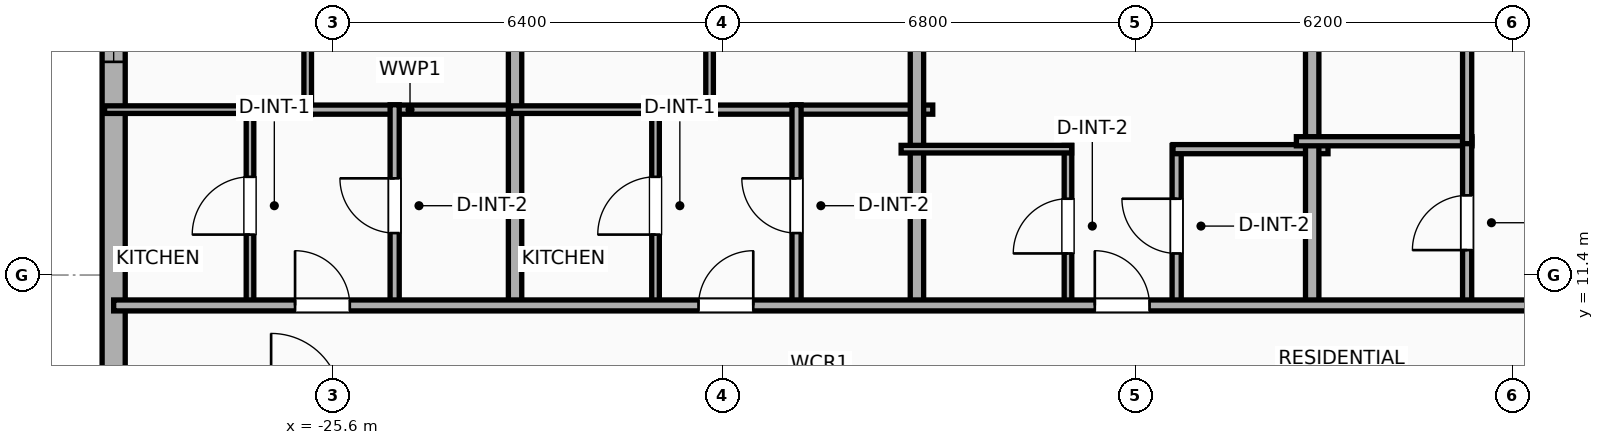
"""IFC4 building model, lengths in metres.
Left out: names, types, materials, properties, quantities, classifications, styles, units other than length and angle.
Written with IfcOpenShell. Run it as: python <this file> out.ifc"""

import sys

from ifc_helpers import new_model, si_unit, direction, frame, frame_2d, origin, place, context, subcontext, project, spatial, rectangle, extrude, element, fill, save


model = new_model("IFC4")
c1 = context("Model", 3, precision=1e-05, world=origin(), true_north=direction((0.0, 1.0)))
c2 = subcontext(c1, "Body", "Model", "MODEL_VIEW")
j1 = project(units=[si_unit("LENGTHUNIT", "METRE"), si_unit("PLANEANGLEUNIT", "RADIAN")], contexts=[c1])
p1 = place(None, origin())
s1 = spatial("IfcSite", under=j1, at=p1, CompositionType="ELEMENT")
p2 = place(p1, origin())
s2 = spatial("IfcBuilding", under=s1, at=p2, CompositionType="ELEMENT")
p3 = place(p2, frame((0.0, 0.0, 89.7)))
s3 = spatial("IfcBuildingStorey", under=s2, at=p3, CompositionType="ELEMENT", Elevation=89.7)
p4 = place(p3, frame((-29.21, -16.581, 0.0), z_axis=(0.0, 0.0, 1.0), x_axis=(0.0, 1.0, 0.0)))
e1 = element("IfcWall", 1, at=p4, inside=s3, PredefinedType="ELEMENTEDWALL", context=c2, shape_type="SweptSolid", body=[
    extrude(rectangle(XDim=34.363, YDim=0.38, at=frame_2d((17.181, 0.0))), origin(), (0.0, 0.0, 1.0), 2.54),
])
p5 = place(p4, frame((31.487, 0.0, 0.75)))
e2 = element("IfcOpeningElement", 2, at=p5, cuts=e1, PredefinedType="OPENING", context=c2, shape_type="SweptSolid", body=[
    extrude(rectangle(XDim=1.2, YDim=1.63, at=frame_2d((0.6, 0.815))), frame((0.0, 0.2, 0.0), z_axis=(0.0, -1.0, 0.0), x_axis=(1.0, 0.0, 0.0)), (0.0, 0.0, 1.0), 0.4),
])
p6 = place(p4, frame((20.726, 0.0, 0.75)))
e3 = element("IfcOpeningElement", 3, at=p6, cuts=e1, PredefinedType="OPENING", context=c2, shape_type="SweptSolid", body=[
    extrude(rectangle(XDim=1.2, YDim=1.63, at=frame_2d((0.6, 0.815))), frame((0.0, 0.2, 0.0), z_axis=(0.0, -1.0, 0.0), x_axis=(1.0, 0.0, 0.0)), (0.0, 0.0, 1.0), 0.4),
])
p7 = place(p4, frame((11.376, 0.0, 0.75)))
e4 = element("IfcOpeningElement", 4, at=p7, cuts=e1, PredefinedType="OPENING", context=c2, shape_type="SweptSolid", body=[
    extrude(rectangle(XDim=1.2, YDim=1.63, at=frame_2d((0.6, 0.815))), frame((0.0, 0.2, 0.0), z_axis=(0.0, -1.0, 0.0), x_axis=(1.0, 0.0, 0.0)), (0.0, 0.0, 1.0), 0.4),
])
p8 = place(p3, frame((-26.019, 14.04, 0.0), z_axis=(0.0, 0.0, 1.0), x_axis=(0.0, 1.0, 0.0)))
e5 = element("IfcWall", 5, at=p8, inside=s3, PredefinedType="PARTITIONING", context=c2, shape_type="SweptSolid", body=[
    extrude(rectangle(XDim=7.596, YDim=0.125, at=frame_2d((3.798, 0.0))), origin(), (0.0, 0.0, 1.0), 3.65),
])
p9 = place(p8, frame((1.373, 0.0, 0.0)))
e6 = element("IfcOpeningElement", 6, at=p9, cuts=e5, PredefinedType="OPENING", context=c2, shape_type="SweptSolid", body=[
    extrude(rectangle(XDim=0.9, YDim=2.05, at=frame_2d((0.45, 1.025))), frame((0.0, 0.073, 0.0), z_axis=(0.0, -1.0, 0.0), x_axis=(1.0, 0.0, 0.0)), (0.0, 0.0, 1.0), 0.145),
])
p10 = place(p3, frame((-26.139, 14.12, 0.0), z_axis=(0.0, 0.0, 1.0), x_axis=(1.0, 0.0, 0.0)))
e7 = element("IfcWall", 7, at=p10, inside=s3, PredefinedType="PLUMBINGWALL", context=c2, shape_type="SweptSolid", body=[
    extrude(rectangle(XDim=3.605, YDim=0.15, at=frame_2d((1.802, 0.0))), origin(), (0.0, 0.0, 1.0), 3.65),
])
p11 = place(p3, frame((-26.968, 10.88, 0.0), z_axis=(0.0, 0.0, 1.0), x_axis=(0.0, 1.0, 0.0)))
e8 = element("IfcWall", 8, at=p11, inside=s3, PredefinedType="PARTITIONING", context=c2, shape_type="SweptSolid", body=[
    extrude(rectangle(XDim=3.32, YDim=0.125, at=frame_2d((1.66, 0.0))), origin(), (0.0, 0.0, 1.0), 3.65),
])
p12 = place(p11, frame((1.185, 0.0, 0.0)))
e9 = element("IfcOpeningElement", 9, at=p12, cuts=e8, PredefinedType="OPENING", context=c2, shape_type="SweptSolid", body=[
    extrude(rectangle(XDim=0.95, YDim=2.05, at=frame_2d((0.475, 1.025))), frame((0.0, 0.073, 0.0), z_axis=(0.0, -1.0, 0.0), x_axis=(1.0, 0.0, 0.0)), (0.0, 0.0, 1.0), 0.145),
])
p13 = place(p3, frame((-29.36, 14.12, 0.0), z_axis=(0.0, 0.0, 1.0), x_axis=(1.0, 0.0, 0.0)))
e10 = element("IfcWall", 10, at=p13, inside=s3, PredefinedType="PARTITIONING", context=c2, shape_type="SweptSolid", body=[
    extrude(rectangle(XDim=2.512, YDim=0.125, at=frame_2d((1.256, 0.0))), origin(), (0.0, 0.0, 1.0), 3.65),
])
p14 = place(p3, frame((-24.589, 10.88, 0.0), z_axis=(0.0, 0.0, 1.0), x_axis=(0.0, 1.0, 0.0)))
e11 = element("IfcWall", 11, at=p14, inside=s3, PredefinedType="PLUMBINGWALL", context=c2, shape_type="SweptSolid", body=[
    extrude(rectangle(XDim=3.32, YDim=0.15, at=frame_2d((1.66, 0.0))), origin(), (0.0, 0.0, 1.0), 3.65),
])
p15 = place(p14, frame((1.21, 0.0, 0.0)))
e12 = element("IfcOpeningElement", 12, at=p15, cuts=e11, PredefinedType="OPENING", context=c2, shape_type="SweptSolid", body=[
    extrude(rectangle(XDim=0.9, YDim=2.05, at=frame_2d((0.45, 1.025))), frame((0.0, 0.085, 0.0), z_axis=(0.0, -1.0, 0.0), x_axis=(1.0, 0.0, 0.0)), (0.0, 0.0, 1.0), 0.17),
])
p16 = place(p3, frame((-22.609, 10.82, 0.0), z_axis=(0.0, 0.0, 1.0), x_axis=(0.0, 1.0, 0.0)))
e13 = element("IfcWall", 13, at=p16, inside=s3, PredefinedType="PARTITIONING", context=c2, shape_type="SweptSolid", body=[
    extrude(rectangle(XDim=10.79, YDim=0.22, at=frame_2d((5.395, 0.0))), origin(), (0.0, 0.0, 1.0), 3.65),
])
p17 = place(p3, frame((-19.41, 14.04, 0.0), z_axis=(0.0, 0.0, 1.0), x_axis=(0.0, 1.0, 0.0)))
e14 = element("IfcWall", 14, at=p17, inside=s3, PredefinedType="PARTITIONING", context=c2, shape_type="SweptSolid", body=[
    extrude(rectangle(XDim=7.72, YDim=0.125, at=frame_2d((3.86, 0.0))), origin(), (0.0, 0.0, 1.0), 3.65),
])
p18 = place(p17, frame((1.403, 0.0, 0.0)))
e15 = element("IfcOpeningElement", 15, at=p18, cuts=e14, PredefinedType="OPENING", context=c2, shape_type="SweptSolid", body=[
    extrude(rectangle(XDim=0.9, YDim=2.05, at=frame_2d((0.45, 1.025))), frame((0.0, 0.073, 0.0), z_axis=(0.0, -1.0, 0.0), x_axis=(1.0, 0.0, 0.0)), (0.0, 0.0, 1.0), 0.145),
])
p19 = place(p3, frame((-19.53, 14.12, 0.0), z_axis=(0.0, 0.0, 1.0), x_axis=(1.0, 0.0, 0.0)))
e16 = element("IfcWall", 16, at=p19, inside=s3, PredefinedType="PLUMBINGWALL", context=c2, shape_type="SweptSolid", body=[
    extrude(rectangle(XDim=3.79, YDim=0.15, at=frame_2d((1.895, 0.0))), origin(), (0.0, 0.0, 1.0), 3.65),
])
p20 = place(p3, frame((-20.299, 10.88, 0.0), z_axis=(0.0, 0.0, 1.0), x_axis=(0.0, 1.0, 0.0)))
e17 = element("IfcWall", 17, at=p20, inside=s3, PredefinedType="PARTITIONING", context=c2, shape_type="SweptSolid", body=[
    extrude(rectangle(XDim=3.32, YDim=0.125, at=frame_2d((1.66, 0.0))), origin(), (0.0, 0.0, 1.0), 3.65),
])
p21 = place(p20, frame((1.185, 0.0, 0.0)))
e18 = element("IfcOpeningElement", 18, at=p21, cuts=e17, PredefinedType="OPENING", context=c2, shape_type="SweptSolid", body=[
    extrude(rectangle(XDim=0.95, YDim=2.05, at=frame_2d((0.475, 1.025))), frame((0.0, 0.073, 0.0), z_axis=(0.0, -1.0, 0.0), x_axis=(1.0, 0.0, 0.0)), (0.0, 0.0, 1.0), 0.145),
])
p22 = place(p3, frame((-22.684, 14.12, 0.0), z_axis=(0.0, 0.0, 1.0), x_axis=(1.0, 0.0, 0.0)))
e19 = element("IfcWall", 19, at=p22, inside=s3, PredefinedType="PARTITIONING", context=c2, shape_type="SweptSolid", body=[
    extrude(rectangle(XDim=2.505, YDim=0.125, at=frame_2d((1.252, 0.0))), origin(), (0.0, 0.0, 1.0), 3.65),
])
p23 = place(p3, frame((-17.98, 10.88, 0.0), z_axis=(0.0, 0.0, 1.0), x_axis=(0.0, 1.0, 0.0)))
e20 = element("IfcWall", 20, at=p23, inside=s3, PredefinedType="PLUMBINGWALL", context=c2, shape_type="SweptSolid", body=[
    extrude(rectangle(XDim=3.32, YDim=0.15, at=frame_2d((1.66, 0.0))), origin(), (0.0, 0.0, 1.0), 3.65),
])
p24 = place(p23, frame((1.21, 0.0, 0.0)))
e21 = element("IfcOpeningElement", 21, at=p24, cuts=e20, PredefinedType="OPENING", context=c2, shape_type="SweptSolid", body=[
    extrude(rectangle(XDim=0.9, YDim=2.05, at=frame_2d((0.45, 1.025))), frame((0.0, 0.085, 0.0), z_axis=(0.0, -1.0, 0.0), x_axis=(1.0, 0.0, 0.0)), (0.0, 0.0, 1.0), 0.17),
])
p25 = place(p3, frame((-16.0, 10.82, 0.0), z_axis=(0.0, 0.0, 1.0), x_axis=(0.0, 1.0, 0.0)))
e22 = element("IfcWall", 22, at=p25, inside=s3, PredefinedType="PARTITIONING", context=c2, shape_type="SweptSolid", body=[
    extrude(rectangle(XDim=10.79, YDim=0.22, at=frame_2d((5.395, 0.0))), origin(), (0.0, 0.0, 1.0), 3.65),
])
p26 = place(p3, frame((-13.516, 10.88, 0.0), z_axis=(0.0, 0.0, 1.0), x_axis=(0.0, 1.0, 0.0)))
e23 = element("IfcWall", 23, at=p26, inside=s3, PredefinedType="PARTITIONING", context=c2, shape_type="SweptSolid", body=[
    extrude(rectangle(XDim=2.65, YDim=0.125, at=frame_2d((1.325, 0.0))), origin(), (0.0, 0.0, 1.0), 3.65),
])
p27 = place(p26, frame((0.875, 0.0, 0.0)))
e24 = element("IfcOpeningElement", 24, at=p27, cuts=e23, PredefinedType="OPENING", context=c2, shape_type="SweptSolid", body=[
    extrude(rectangle(XDim=0.9, YDim=2.05, at=frame_2d((0.45, 1.025))), frame((0.0, 0.073, 0.0), z_axis=(0.0, -1.0, 0.0), x_axis=(1.0, 0.0, 0.0)), (0.0, 0.0, 1.0), 0.145),
])
p28 = place(p3, frame((-11.729, 10.88, 0.0), z_axis=(0.0, 0.0, 1.0), x_axis=(0.0, 1.0, 0.0)))
e25 = element("IfcWall", 25, at=p28, inside=s3, PredefinedType="PLUMBINGWALL", context=c2, shape_type="SweptSolid", body=[
    extrude(rectangle(XDim=2.65, YDim=0.15, at=frame_2d((1.325, 0.0))), origin(), (0.0, 0.0, 1.0), 3.65),
])
p29 = place(p28, frame((0.875, 0.0, 0.0)))
e26 = element("IfcOpeningElement", 26, at=p29, cuts=e25, PredefinedType="OPENING", context=c2, shape_type="SweptSolid", body=[
    extrude(rectangle(XDim=0.9, YDim=2.05, at=frame_2d((0.45, 1.025))), frame((0.0, 0.085, 0.0), z_axis=(0.0, -1.0, 0.0), x_axis=(1.0, 0.0, 0.0)), (0.0, 0.0, 1.0), 0.17),
])
p30 = place(p3, frame((-16.26, 13.47, 0.0), z_axis=(0.0, 0.0, 1.0), x_axis=(1.0, 0.0, 0.0)))
e27 = element("IfcWall", 27, at=p30, inside=s3, PredefinedType="PARTITIONING", context=c2, shape_type="SweptSolid", body=[
    extrude(rectangle(XDim=2.804, YDim=0.125, at=frame_2d((1.402, 0.0))), origin(), (0.0, 0.0, 1.0), 3.65),
])
p31 = place(p3, frame((-11.789, 13.47, 0.0), z_axis=(0.0, 0.0, 1.0), x_axis=(1.0, 0.0, 0.0)))
e28 = element("IfcWall", 28, at=p31, inside=s3, PredefinedType="PLUMBINGWALL", context=c2, shape_type="SweptSolid", body=[
    extrude(rectangle(XDim=2.549, YDim=0.15, at=frame_2d((1.274, 0.0))), origin(), (0.0, 0.0, 1.0), 3.65),
])
p32 = place(p3, frame((-9.5, 10.82, 0.0), z_axis=(0.0, 0.0, 1.0), x_axis=(0.0, 1.0, 0.0)))
e29 = element("IfcWall", 29, at=p32, inside=s3, PredefinedType="PARTITIONING", context=c2, shape_type="SweptSolid", body=[
    extrude(rectangle(XDim=10.79, YDim=0.22, at=frame_2d((5.395, 0.0))), origin(), (0.0, 0.0, 1.0), 3.65),
])
p33 = place(p3, frame((-9.76, 13.6, 0.0), z_axis=(0.0, 0.0, 1.0), x_axis=(1.0, 0.0, 0.0)))
e30 = element("IfcWall", 30, at=p33, inside=s3, PredefinedType="PLUMBINGWALL", context=c2, shape_type="SweptSolid", body=[
    extrude(rectangle(XDim=2.888, YDim=0.15, at=frame_2d((1.444, 0.0))), origin(), (0.0, 0.0, 1.0), 3.65),
])
p34 = place(p3, frame((-6.952, 10.88, 0.0), z_axis=(0.0, 0.0, 1.0), x_axis=(0.0, 1.0, 0.0)))
e31 = element("IfcWall", 31, at=p34, inside=s3, PredefinedType="PLUMBINGWALL", context=c2, shape_type="SweptSolid", body=[
    extrude(rectangle(XDim=2.76, YDim=0.15, at=frame_2d((1.38, 0.0))), origin(), (0.0, 0.0, 1.0), 3.65),
])
p35 = place(p34, frame((0.93, 0.0, 0.0)))
e32 = element("IfcOpeningElement", 32, at=p35, cuts=e31, PredefinedType="OPENING", context=c2, shape_type="SweptSolid", body=[
    extrude(rectangle(XDim=0.9, YDim=2.05, at=frame_2d((0.45, 1.025))), frame((0.0, 0.085, 0.0), z_axis=(0.0, -1.0, 0.0), x_axis=(1.0, 0.0, 0.0)), (0.0, 0.0, 1.0), 0.17),
])
p36 = place(p3, frame((-6.952, 13.56, 0.0), z_axis=(0.0, 0.0, 1.0), x_axis=(0.0, 1.0, 0.0)))
e33 = element("IfcWall", 33, at=p36, inside=s3, PredefinedType="PLUMBINGWALL", context=c2, shape_type="SweptSolid", body=[
    extrude(rectangle(XDim=8.098, YDim=0.15, at=frame_2d((4.049, 0.0))), origin(), (0.0, 0.0, 1.0), 3.65),
])
p37 = place(p36, frame((3.599, 0.0, 0.0)))
e34 = element("IfcOpeningElement", 34, at=p37, cuts=e33, PredefinedType="OPENING", context=c2, shape_type="SweptSolid", body=[
    extrude(rectangle(XDim=0.9, YDim=2.05, at=frame_2d((0.45, 1.025))), frame((0.0, 0.085, 0.0), z_axis=(0.0, -1.0, 0.0), x_axis=(1.0, 0.0, 0.0)), (0.0, 0.0, 1.0), 0.17),
])
p38 = place(p3, frame((-29.21, 10.9, 0.0), z_axis=(0.0, 0.0, 1.0), x_axis=(1.0, 0.0, 0.0)))
e35 = element("IfcWall", 35, at=p38, inside=s3, PredefinedType="PARTITIONING", context=c2, shape_type="SweptSolid", body=[
    extrude(rectangle(XDim=62.42, YDim=0.18, at=frame_2d((31.21, 0.0))), origin(), (0.0, 0.0, 1.0), 3.65),
])
p39 = place(p38, frame((2.983, 0.0, 0.0)))
e36 = element("IfcOpeningElement", 36, at=p39, cuts=e35, PredefinedType="OPENING", context=c2, shape_type="SweptSolid", body=[
    extrude(rectangle(XDim=0.9, YDim=2.05, at=frame_2d((0.45, 1.025))), frame((0.0, 0.1, 0.0), z_axis=(0.0, -1.0, 0.0), x_axis=(1.0, 0.0, 0.0)), (0.0, 0.0, 1.0), 0.2),
])
p40 = place(p38, frame((9.618, 0.0, 0.0)))
e37 = element("IfcOpeningElement", 37, at=p40, cuts=e35, PredefinedType="OPENING", context=c2, shape_type="SweptSolid", body=[
    extrude(rectangle(XDim=0.9, YDim=2.05, at=frame_2d((0.45, 1.025))), frame((0.0, 0.1, 0.0), z_axis=(0.0, -1.0, 0.0), x_axis=(1.0, 0.0, 0.0)), (0.0, 0.0, 1.0), 0.2),
])
p41 = place(p38, frame((16.135, 0.0, 0.0)))
e38 = element("IfcOpeningElement", 38, at=p41, cuts=e35, PredefinedType="OPENING", context=c2, shape_type="SweptSolid", body=[
    extrude(rectangle(XDim=0.9, YDim=2.05, at=frame_2d((0.45, 1.025))), frame((0.0, 0.1, 0.0), z_axis=(0.0, -1.0, 0.0), x_axis=(1.0, 0.0, 0.0)), (0.0, 0.0, 1.0), 0.2),
])
p42 = place(p38, frame((23.632, 0.0, 0.0)))
e39 = element("IfcOpeningElement", 39, at=p42, cuts=e35, PredefinedType="OPENING", context=c2, shape_type="SweptSolid", body=[
    extrude(rectangle(XDim=1.15, YDim=2.05, at=frame_2d((0.575, 1.025))), frame((0.0, 0.1, 0.0), z_axis=(0.0, -1.0, 0.0), x_axis=(1.0, 0.0, 0.0)), (0.0, 0.0, 1.0), 0.2),
])
p43 = place(p38, frame((27.751, 0.0, 0.0)))
e40 = element("IfcOpeningElement", 40, at=p43, cuts=e35, PredefinedType="OPENING", context=c2, shape_type="SweptSolid", body=[
    extrude(rectangle(XDim=1.15, YDim=2.05, at=frame_2d((0.575, 1.025))), frame((0.0, 0.1, 0.0), z_axis=(0.0, -1.0, 0.0), x_axis=(1.0, 0.0, 0.0)), (0.0, 0.0, 1.0), 0.2),
])
p44 = place(p38, frame((35.635, 0.0, 0.0)))
e41 = element("IfcOpeningElement", 41, at=p44, cuts=e35, PredefinedType="OPENING", context=c2, shape_type="SweptSolid", body=[
    extrude(rectangle(XDim=0.9, YDim=2.05, at=frame_2d((0.45, 1.025))), frame((0.0, 0.1, 0.0), z_axis=(0.0, -1.0, 0.0), x_axis=(1.0, 0.0, 0.0)), (0.0, 0.0, 1.0), 0.2),
])
p45 = place(p38, frame((40.616, 0.0, 0.0)))
e42 = element("IfcOpeningElement", 42, at=p45, cuts=e35, PredefinedType="OPENING", context=c2, shape_type="SweptSolid", body=[
    extrude(rectangle(XDim=1.15, YDim=2.05, at=frame_2d((0.575, 1.025))), frame((0.0, 0.1, 0.0), z_axis=(0.0, -1.0, 0.0), x_axis=(1.0, 0.0, 0.0)), (0.0, 0.0, 1.0), 0.2),
])
p46 = place(p38, frame((48.256, 0.0, 0.0)))
e43 = element("IfcOpeningElement", 43, at=p46, cuts=e35, PredefinedType="OPENING", context=c2, shape_type="SweptSolid", body=[
    extrude(rectangle(XDim=0.9, YDim=2.05, at=frame_2d((0.45, 1.025))), frame((0.0, 0.1, 0.0), z_axis=(0.0, -1.0, 0.0), x_axis=(1.0, 0.0, 0.0)), (0.0, 0.0, 1.0), 0.2),
])
p47 = place(p38, frame((57.032, 0.0, 0.0)))
e44 = element("IfcOpeningElement", 44, at=p47, cuts=e35, PredefinedType="OPENING", context=c2, shape_type="SweptSolid", body=[
    extrude(rectangle(XDim=1.15, YDim=2.05, at=frame_2d((0.575, 1.025))), frame((0.0, 0.1, 0.0), z_axis=(0.0, -1.0, 0.0), x_axis=(1.0, 0.0, 0.0)), (0.0, 0.0, 1.0), 0.2),
])
p48 = place(p5, origin())
e45 = element("IfcWindow", 45, at=p48, inside=s3, PartitioningType="SINGLE_PANEL", PredefinedType="WINDOW", context=c2, shape_type="SweptSolid", body=[
    extrude(rectangle(XDim=1.2, YDim=1.63, at=frame_2d((0.6, 0.815))), frame((0.0, 0.03, 0.0), z_axis=(0.0, -1.0, 0.0), x_axis=(1.0, 0.0, 0.0)), (0.0, 0.0, 1.0), 0.06),
])
fill(e2, e45)
p49 = place(p12, origin())
e46 = element("IfcDoor", 46, at=p49, inside=s3, OperationType="SINGLE_SWING_LEFT", PredefinedType="DOOR", context=c2, shape_type="SweptSolid", body=[
    extrude(rectangle(XDim=0.95, YDim=2.05, at=frame_2d((0.475, 1.025))), frame((0.0, 0.025, 0.0), z_axis=(0.0, -1.0, 0.0), x_axis=(1.0, 0.0, 0.0)), (0.0, 0.0, 1.0), 0.05),
])
fill(e9, e46)
p50 = place(p15, origin())
e47 = element("IfcDoor", 47, at=p50, inside=s3, OperationType="SINGLE_SWING_RIGHT", PredefinedType="DOOR", context=c2, shape_type="SweptSolid", body=[
    extrude(rectangle(XDim=0.9, YDim=2.05, at=frame_2d((0.45, 1.025))), frame((0.0, 0.025, 0.0), z_axis=(0.0, -1.0, 0.0), x_axis=(1.0, 0.0, 0.0)), (0.0, 0.0, 1.0), 0.05),
])
fill(e12, e47)
p51 = place(p21, origin())
e48 = element("IfcDoor", 48, at=p51, inside=s3, OperationType="SINGLE_SWING_LEFT", PredefinedType="DOOR", context=c2, shape_type="SweptSolid", body=[
    extrude(rectangle(XDim=0.95, YDim=2.05, at=frame_2d((0.475, 1.025))), frame((0.0, 0.025, 0.0), z_axis=(0.0, -1.0, 0.0), x_axis=(1.0, 0.0, 0.0)), (0.0, 0.0, 1.0), 0.05),
])
fill(e18, e48)
p52 = place(p24, origin())
e49 = element("IfcDoor", 49, at=p52, inside=s3, OperationType="SINGLE_SWING_RIGHT", PredefinedType="DOOR", context=c2, shape_type="SweptSolid", body=[
    extrude(rectangle(XDim=0.9, YDim=2.05, at=frame_2d((0.45, 1.025))), frame((0.0, 0.025, 0.0), z_axis=(0.0, -1.0, 0.0), x_axis=(1.0, 0.0, 0.0)), (0.0, 0.0, 1.0), 0.05),
])
fill(e21, e49)
p53 = place(p27, origin())
e50 = element("IfcDoor", 50, at=p53, inside=s3, OperationType="SINGLE_SWING_LEFT", PredefinedType="DOOR", context=c2, shape_type="SweptSolid", body=[
    extrude(rectangle(XDim=0.9, YDim=2.05, at=frame_2d((0.45, 1.025))), frame((0.0, 0.025, 0.0), z_axis=(0.0, -1.0, 0.0), x_axis=(1.0, 0.0, 0.0)), (0.0, 0.0, 1.0), 0.05),
])
fill(e24, e50)
p54 = place(p29, origin())
e51 = element("IfcDoor", 51, at=p54, inside=s3, OperationType="SINGLE_SWING_RIGHT", PredefinedType="DOOR", context=c2, shape_type="SweptSolid", body=[
    extrude(rectangle(XDim=0.9, YDim=2.05, at=frame_2d((0.45, 1.025))), frame((0.0, 0.025, 0.0), z_axis=(0.0, -1.0, 0.0), x_axis=(1.0, 0.0, 0.0)), (0.0, 0.0, 1.0), 0.05),
])
fill(e26, e51)
p55 = place(p35, origin())
e52 = element("IfcDoor", 52, at=p55, inside=s3, OperationType="SINGLE_SWING_LEFT", PredefinedType="DOOR", context=c2, shape_type="SweptSolid", body=[
    extrude(rectangle(XDim=0.9, YDim=2.05, at=frame_2d((0.45, 1.025))), frame((0.0, 0.025, 0.0), z_axis=(0.0, -1.0, 0.0), x_axis=(1.0, 0.0, 0.0)), (0.0, 0.0, 1.0), 0.05),
])
fill(e32, e52)
p56 = place(p39, origin())
e53 = element("IfcDoor", 53, at=p56, inside=s3, OperationType="SINGLE_SWING_LEFT", PredefinedType="DOOR", context=c2, shape_type="SweptSolid", body=[
    extrude(rectangle(XDim=0.9, YDim=2.05, at=frame_2d((0.45, 1.025))), frame((0.0, 0.025, 0.0), z_axis=(0.0, -1.0, 0.0), x_axis=(1.0, 0.0, 0.0)), (0.0, 0.0, 1.0), 0.05),
])
fill(e36, e53)
p57 = place(p40, origin())
e54 = element("IfcDoor", 54, at=p57, inside=s3, OperationType="SINGLE_SWING_RIGHT", PredefinedType="DOOR", context=c2, shape_type="SweptSolid", body=[
    extrude(rectangle(XDim=0.9, YDim=2.05, at=frame_2d((0.45, 1.025))), frame((0.0, 0.025, 0.0), z_axis=(0.0, -1.0, 0.0), x_axis=(1.0, 0.0, 0.0)), (0.0, 0.0, 1.0), 0.05),
])
fill(e37, e54)
p58 = place(p41, origin())
e55 = element("IfcDoor", 55, at=p58, inside=s3, OperationType="SINGLE_SWING_LEFT", PredefinedType="DOOR", context=c2, shape_type="SweptSolid", body=[
    extrude(rectangle(XDim=0.9, YDim=2.05, at=frame_2d((0.45, 1.025))), frame((0.0, 0.025, 0.0), z_axis=(0.0, -1.0, 0.0), x_axis=(1.0, 0.0, 0.0)), (0.0, 0.0, 1.0), 0.05),
])
fill(e38, e55)
save(model, sys.argv[1])
